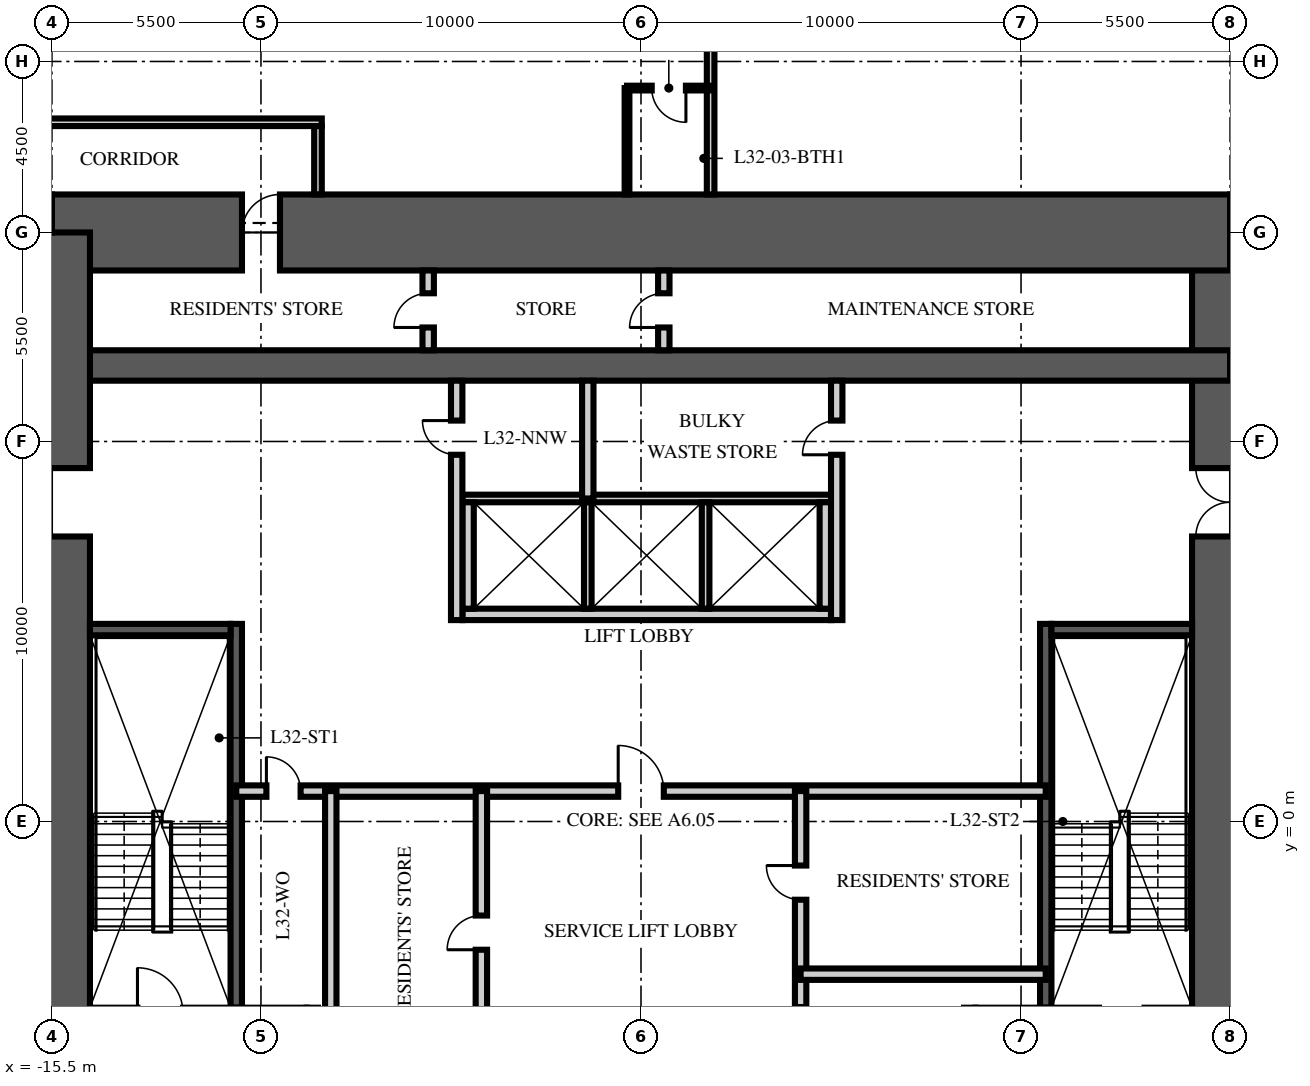
"""IFC4 building model, lengths in metres.
Left out: names, types, materials, properties, quantities, classifications, styles, units other than length and angle.
Written with IfcOpenShell. Run it as: python <this file> out.ifc"""

import sys

from ifc_helpers import new_model, si_unit, direction, frame, frame_2d, origin, place, context, subcontext, project, spatial, rectangle, extrude, element, fill, save


model = new_model("IFC4")
c1 = context("Model", 3, precision=1e-05, world=origin(), true_north=direction((0.0, 1.0)))
c2 = subcontext(c1, "Body", "Model", "MODEL_VIEW")
j1 = project(units=[si_unit("LENGTHUNIT", "METRE"), si_unit("PLANEANGLEUNIT", "RADIAN")], contexts=[c1])
p1 = place(None, origin())
s1 = spatial("IfcSite", under=j1, at=p1, CompositionType="ELEMENT")
p2 = place(p1, origin())
s2 = spatial("IfcBuilding", under=s1, at=p2, CompositionType="ELEMENT")
p3 = place(p2, frame((0.0, 0.0, 129.75)))
s3 = spatial("IfcBuildingStorey", under=s2, at=p3, CompositionType="ELEMENT", Elevation=129.75)
p4 = place(p3, frame((15.5, -15.5, -0.25), z_axis=(0.0, 0.0, 1.0), x_axis=(0.0, 1.0, 0.0)))
e1 = element("IfcWall", 1, at=p4, inside=s3, PredefinedType="SHEAR", context=c2, shape_type="SweptSolid", body=[
    extrude(rectangle(XDim=31.0, YDim=2.0, at=frame_2d((15.5, 0.0))), origin(), (0.0, 0.0, 1.0), 3.75),
])
p5 = place(p4, frame((6.5, 0.0, 0.25)))
e2 = element("IfcOpeningElement", 2, at=p5, cuts=e1, PredefinedType="OPENING", context=c2, shape_type="SweptSolid", body=[
    extrude(rectangle(XDim=1.2, YDim=2.1, at=frame_2d((0.6, 1.05))), frame((0.0, 1.01, 0.0), z_axis=(0.0, -1.0, 0.0), x_axis=(1.0, 0.0, 0.0)), (0.0, 0.0, 1.0), 2.02),
])
p6 = place(p4, frame((23.0, 0.0, 0.25)))
e3 = element("IfcOpeningElement", 3, at=p6, cuts=e1, PredefinedType="OPENING", context=c2, shape_type="SweptSolid", body=[
    extrude(rectangle(XDim=1.8, YDim=2.1, at=frame_2d((0.9, 1.05))), frame((0.0, 1.01, 0.0), z_axis=(0.0, -1.0, 0.0), x_axis=(1.0, 0.0, 0.0)), (0.0, 0.0, 1.0), 2.02),
])
p7 = place(p3, frame((-15.5, 15.5, -0.25), z_axis=(0.0, 0.0, 1.0), x_axis=(1.0, 0.0, 0.0)))
e4 = element("IfcWall", 4, at=p7, inside=s3, PredefinedType="SHEAR", context=c2, shape_type="SweptSolid", body=[
    extrude(rectangle(XDim=31.0, YDim=2.0, at=frame_2d((15.5, 0.0))), origin(), (0.0, 0.0, 1.0), 3.75),
])
p8 = place(p7, frame((5.0, 0.0, 0.25)))
e5 = element("IfcOpeningElement", 5, at=p8, cuts=e4, PredefinedType="OPENING", context=c2, shape_type="SweptSolid", body=[
    extrude(rectangle(XDim=1.0, YDim=2.1, at=frame_2d((0.5, 1.05))), frame((0.0, 1.01, 0.0), z_axis=(0.0, -1.0, 0.0), x_axis=(1.0, 0.0, 0.0)), (0.0, 0.0, 1.0), 2.02),
])
p9 = place(p3, frame((-15.5, 12.0, -0.25), z_axis=(0.0, 0.0, 1.0), x_axis=(1.0, 0.0, 0.0)))
e6 = element("IfcWall", 6, at=p9, inside=s3, PredefinedType="SHEAR", context=c2, shape_type="SweptSolid", body=[
    extrude(rectangle(XDim=31.0, YDim=0.8, at=frame_2d((15.5, 0.0))), origin(), (0.0, 0.0, 1.0), 3.75),
])
p10 = place(p3, frame((-15.5, -15.5, -0.25), z_axis=(0.0, 0.0, 1.0), x_axis=(0.0, 1.0, 0.0)))
e7 = element("IfcWall", 7, at=p10, inside=s3, PredefinedType="SHEAR", context=c2, shape_type="SweptSolid", body=[
    extrude(rectangle(XDim=31.0, YDim=2.0, at=frame_2d((15.5, 0.0))), origin(), (0.0, 0.0, 1.0), 3.75),
])
p11 = place(p10, frame((6.5, 0.0, 0.25)))
e8 = element("IfcOpeningElement", 8, at=p11, cuts=e7, PredefinedType="OPENING", context=c2, shape_type="SweptSolid", body=[
    extrude(rectangle(XDim=1.2, YDim=2.1, at=frame_2d((0.6, 1.05))), frame((0.0, 1.01, 0.0), z_axis=(0.0, -1.0, 0.0), x_axis=(1.0, 0.0, 0.0)), (0.0, 0.0, 1.0), 2.02),
])
p12 = place(p10, frame((23.0, 0.0, 0.25)))
e9 = element("IfcOpeningElement", 9, at=p12, cuts=e7, PredefinedType="OPENING", context=c2, shape_type="SweptSolid", body=[
    extrude(rectangle(XDim=1.8, YDim=2.1, at=frame_2d((0.9, 1.05))), frame((0.0, 1.01, 0.0), z_axis=(0.0, -1.0, 0.0), x_axis=(1.0, 0.0, 0.0)), (0.0, 0.0, 1.0), 2.02),
])
p13 = place(p3, frame((-10.65, -4.9, 0.0), z_axis=(0.0, 0.0, 1.0), x_axis=(0.0, 1.0, 0.0)))
e10 = element("IfcWall", 10, at=p13, inside=s3, PredefinedType="SOLIDWALL", context=c2, shape_type="SweptSolid", body=[
    extrude(rectangle(XDim=10.1, YDim=0.3, at=frame_2d((5.05, 0.0))), origin(), (0.0, 0.0, 1.0), 3.5),
])
p14 = place(p3, frame((-14.5, 5.05, 0.0), z_axis=(0.0, 0.0, 1.0), x_axis=(1.0, 0.0, 0.0)))
e11 = element("IfcWall", 11, at=p14, inside=s3, PredefinedType="SOLIDWALL", context=c2, shape_type="SweptSolid", body=[
    extrude(rectangle(XDim=3.7, YDim=0.3, at=frame_2d((1.85, 0.0))), origin(), (0.0, 0.0, 1.0), 3.5),
])
p15 = place(p3, frame((10.65, -4.9, 0.0), z_axis=(0.0, 0.0, 1.0), x_axis=(0.0, 1.0, 0.0)))
e12 = element("IfcWall", 12, at=p15, inside=s3, PredefinedType="SOLIDWALL", context=c2, shape_type="SweptSolid", body=[
    extrude(rectangle(XDim=10.1, YDim=0.3, at=frame_2d((5.05, 0.0))), origin(), (0.0, 0.0, 1.0), 3.5),
])
p16 = place(p3, frame((14.5, 5.05, 0.0), z_axis=(0.0, 0.0, 1.0), x_axis=(-1.0, 0.0, 0.0)))
e13 = element("IfcWall", 13, at=p16, inside=s3, PredefinedType="SOLIDWALL", context=c2, shape_type="SweptSolid", body=[
    extrude(rectangle(XDim=3.7, YDim=0.3, at=frame_2d((1.85, 0.0))), origin(), (0.0, 0.0, 1.0), 3.5),
])
p17 = place(p3, frame((-4.7, 5.45, 0.0), z_axis=(0.0, 0.0, 1.0), x_axis=(1.0, 0.0, 0.0)))
e14 = element("IfcWall", 14, at=p17, inside=s3, PredefinedType="PARTITIONING", context=c2, shape_type="SweptSolid", body=[
    extrude(rectangle(XDim=9.7, YDim=0.3, at=frame_2d((4.85, 0.0))), origin(), (0.0, 0.0, 1.0), 3.5),
])
p18 = place(p3, frame((-4.7, 8.5, 0.0), z_axis=(0.0, 0.0, 1.0), x_axis=(1.0, 0.0, 0.0)))
e15 = element("IfcWall", 15, at=p18, inside=s3, PredefinedType="PARTITIONING", context=c2, shape_type="SweptSolid", body=[
    extrude(rectangle(XDim=9.7, YDim=0.2, at=frame_2d((4.85, 0.0))), origin(), (0.0, 0.0, 1.0), 3.5),
])
for number, where, z_axis, x_axis in (
    (16, (-4.55, 5.6, 0.0), (0.0, 0.0, 1.0), (0.0, 1.0, 0.0)),
    (17, (4.85, 5.6, 0.0), (0.0, 0.0, 1.0), (0.0, 1.0, 0.0)),
):
    element("IfcWall", number, at=place(p3, frame(where, z_axis=z_axis, x_axis=x_axis)), inside=s3, PredefinedType="PARTITIONING", context=c2, shape_type="SweptSolid", body=[
        extrude(rectangle(XDim=2.8, YDim=0.3, at=frame_2d((1.4, 0.0))), origin(), (0.0, 0.0, 1.0), 3.5),
    ])
for number, where, z_axis, x_axis in (
    (18, (-1.4, 5.6, 0.0), (0.0, 0.0, 1.0), (0.0, 1.0, 0.0)),
    (19, (1.7, 5.6, 0.0), (0.0, 0.0, 1.0), (0.0, 1.0, 0.0)),
):
    element("IfcWall", number, at=place(p3, frame(where, z_axis=z_axis, x_axis=x_axis)), inside=s3, PredefinedType="PARTITIONING", context=c2, shape_type="SweptSolid", body=[
        extrude(rectangle(XDim=2.8, YDim=0.2, at=frame_2d((1.4, 0.0))), origin(), (0.0, 0.0, 1.0), 3.5),
    ])
p19 = place(p3, frame((-10.65, 0.8, 0.0), z_axis=(0.0, 0.0, 1.0), x_axis=(1.0, 0.0, 0.0)))
e20 = element("IfcWall", 20, at=p19, inside=s3, PredefinedType="PARTITIONING", context=c2, shape_type="SweptSolid", body=[
    extrude(rectangle(XDim=21.3, YDim=0.3, at=frame_2d((10.65, 0.0))), origin(), (0.0, 0.0, 1.0), 3.5),
])
p20 = place(p19, frame((10.05, 0.0, 0.0)))
e21 = element("IfcOpeningElement", 21, at=p20, cuts=e20, PredefinedType="OPENING", context=c2, shape_type="SweptSolid", body=[
    extrude(rectangle(XDim=1.2, YDim=2.1, at=frame_2d((0.6, 1.05))), frame((0.0, 0.16, 0.0), z_axis=(0.0, -1.0, 0.0), x_axis=(1.0, 0.0, 0.0)), (0.0, 0.0, 1.0), 0.32),
])
p21 = place(p19, frame((0.793, 0.0, 0.0)))
e22 = element("IfcOpeningElement", 22, at=p21, cuts=e20, PredefinedType="OPENING", context=c2, shape_type="SweptSolid", body=[
    extrude(rectangle(XDim=0.9, YDim=2.1, at=frame_2d((0.45, 1.05))), frame((0.0, 0.16, 0.0), z_axis=(0.0, -1.0, 0.0), x_axis=(1.0, 0.0, 0.0)), (0.0, 0.0, 1.0), 0.32),
])
p22 = place(p3, frame((-4.2, -6.65, 0.0), z_axis=(0.0, 0.0, 1.0), x_axis=(0.0, 1.0, 0.0)))
e23 = element("IfcWall", 23, at=p22, inside=s3, PredefinedType="PARTITIONING", context=c2, shape_type="SweptSolid", body=[
    extrude(rectangle(XDim=7.45, YDim=0.3, at=frame_2d((3.725, 0.0))), origin(), (0.0, 0.0, 1.0), 3.5),
])
p23 = place(p22, frame((3.275, 0.0, 0.0)))
e24 = element("IfcOpeningElement", 24, at=p23, cuts=e23, PredefinedType="OPENING", context=c2, shape_type="SweptSolid", body=[
    extrude(rectangle(XDim=0.9, YDim=2.1, at=frame_2d((0.45, 1.05))), frame((0.0, 0.16, 0.0), z_axis=(0.0, -1.0, 0.0), x_axis=(1.0, 0.0, 0.0)), (0.0, 0.0, 1.0), 0.32),
])
p24 = place(p3, frame((4.2, -6.65, 0.0), z_axis=(0.0, 0.0, 1.0), x_axis=(0.0, 1.0, 0.0)))
e25 = element("IfcWall", 25, at=p24, inside=s3, PredefinedType="PARTITIONING", context=c2, shape_type="SweptSolid", body=[
    extrude(rectangle(XDim=7.45, YDim=0.3, at=frame_2d((3.725, 0.0))), origin(), (0.0, 0.0, 1.0), 3.5),
])
p25 = place(p24, frame((0.866, 0.0, 0.0)))
e26 = element("IfcOpeningElement", 26, at=p25, cuts=e25, PredefinedType="OPENING", context=c2, shape_type="SweptSolid", body=[
    extrude(rectangle(XDim=0.9, YDim=2.1, at=frame_2d((0.45, 1.05))), frame((0.0, 0.16, 0.0), z_axis=(0.0, -1.0, 0.0), x_axis=(1.0, 0.0, 0.0)), (0.0, 0.0, 1.0), 0.32),
])
p26 = place(p24, frame((4.591, 0.0, 0.0)))
e27 = element("IfcOpeningElement", 27, at=p26, cuts=e25, PredefinedType="OPENING", context=c2, shape_type="SweptSolid", body=[
    extrude(rectangle(XDim=0.9, YDim=2.1, at=frame_2d((0.45, 1.05))), frame((0.0, 0.16, 0.0), z_axis=(0.0, -1.0, 0.0), x_axis=(1.0, 0.0, 0.0)), (0.0, 0.0, 1.0), 0.32),
])
p27 = place(p3, frame((-8.163, -6.65, 0.0), z_axis=(0.0, 0.0, 1.0), x_axis=(0.0, 1.0, 0.0)))
e28 = element("IfcWall", 28, at=p27, inside=s3, PredefinedType="PARTITIONING", context=c2, shape_type="SweptSolid", body=[
    extrude(rectangle(XDim=7.45, YDim=0.3, at=frame_2d((3.725, 0.0))), origin(), (0.0, 0.0, 1.0), 3.5),
])
p28 = place(p3, frame((10.65, -4.018, 0.0), z_axis=(0.0, 0.0, 1.0), x_axis=(-1.0, 0.0, 0.0)))
e29 = element("IfcWall", 29, at=p28, inside=s3, PredefinedType="PARTITIONING", context=c2, shape_type="SweptSolid", body=[
    extrude(rectangle(XDim=6.45, YDim=0.3, at=frame_2d((3.225, 0.0))), origin(), (0.0, 0.0, 1.0), 3.5),
])
p29 = place(p3, frame((-4.85, 5.3, 0.0), z_axis=(0.0, 0.0, 1.0), x_axis=(0.0, 1.0, 0.0)))
e30 = element("IfcWall", 30, at=p29, inside=s3, PredefinedType="PARTITIONING", context=c2, shape_type="SweptSolid", body=[
    extrude(rectangle(XDim=6.3, YDim=0.3, at=frame_2d((3.15, 0.0))), origin(), (0.0, 0.0, 1.0), 3.5),
])
p30 = place(p29, frame((4.35, 0.0, 0.0)))
e31 = element("IfcOpeningElement", 31, at=p30, cuts=e30, PredefinedType="OPENING", context=c2, shape_type="SweptSolid", body=[
    extrude(rectangle(XDim=0.9, YDim=2.1, at=frame_2d((0.45, 1.05))), frame((0.0, 0.16, 0.0), z_axis=(0.0, -1.0, 0.0), x_axis=(1.0, 0.0, 0.0)), (0.0, 0.0, 1.0), 0.32),
])
p31 = place(p3, frame((5.15, 5.3, 0.0), z_axis=(0.0, 0.0, 1.0), x_axis=(0.0, 1.0, 0.0)))
e32 = element("IfcWall", 32, at=p31, inside=s3, PredefinedType="PARTITIONING", context=c2, shape_type="SweptSolid", body=[
    extrude(rectangle(XDim=6.3, YDim=0.3, at=frame_2d((3.15, 0.0))), origin(), (0.0, 0.0, 1.0), 3.5),
])
p32 = place(p31, frame((4.35, 0.0, 0.0)))
e33 = element("IfcOpeningElement", 33, at=p32, cuts=e32, PredefinedType="OPENING", context=c2, shape_type="SweptSolid", body=[
    extrude(rectangle(XDim=0.9, YDim=2.1, at=frame_2d((0.45, 1.05))), frame((0.0, 0.16, 0.0), z_axis=(0.0, -1.0, 0.0), x_axis=(1.0, 0.0, 0.0)), (0.0, 0.0, 1.0), 0.32),
])
p33 = place(p3, frame((-1.4, 8.5, 0.0), z_axis=(0.0, 0.0, 1.0), x_axis=(0.0, 1.0, 0.0)))
e34 = element("IfcWall", 34, at=p33, inside=s3, PredefinedType="PARTITIONING", context=c2, shape_type="SweptSolid", body=[
    extrude(rectangle(XDim=3.1, YDim=0.3, at=frame_2d((1.55, 0.0))), origin(), (0.0, 0.0, 1.0), 3.5),
])
p34 = place(p3, frame((-5.6, 12.4, 0.0), z_axis=(0.0, 0.0, 1.0), x_axis=(0.0, 1.0, 0.0)))
e35 = element("IfcWall", 35, at=p34, inside=s3, PredefinedType="PARTITIONING", context=c2, shape_type="SweptSolid", body=[
    extrude(rectangle(XDim=2.1, YDim=0.3, at=frame_2d((1.05, 0.0))), origin(), (0.0, 0.0, 1.0), 3.5),
])
p35 = place(p34, frame((0.6, 0.0, 0.0)))
e36 = element("IfcOpeningElement", 36, at=p35, cuts=e35, PredefinedType="OPENING", context=c2, shape_type="SweptSolid", body=[
    extrude(rectangle(XDim=0.9, YDim=2.1, at=frame_2d((0.45, 1.05))), frame((0.0, 0.16, 0.0), z_axis=(0.0, -1.0, 0.0), x_axis=(1.0, 0.0, 0.0)), (0.0, 0.0, 1.0), 0.32),
])
p36 = place(p3, frame((0.6, 12.4, 0.0), z_axis=(0.0, 0.0, 1.0), x_axis=(0.0, 1.0, 0.0)))
e37 = element("IfcWall", 37, at=p36, inside=s3, PredefinedType="PARTITIONING", context=c2, shape_type="SweptSolid", body=[
    extrude(rectangle(XDim=2.1, YDim=0.3, at=frame_2d((1.05, 0.0))), origin(), (0.0, 0.0, 1.0), 3.5),
])
p37 = place(p36, frame((0.6, 0.0, 0.0)))
e38 = element("IfcOpeningElement", 38, at=p37, cuts=e37, PredefinedType="OPENING", context=c2, shape_type="SweptSolid", body=[
    extrude(rectangle(XDim=0.9, YDim=2.1, at=frame_2d((0.45, 1.05))), frame((0.0, 0.16, 0.0), z_axis=(0.0, -1.0, 0.0), x_axis=(1.0, 0.0, 0.0)), (0.0, 0.0, 1.0), 0.32),
])
p38 = place(p3, frame((-18.5, 18.4, 0.0), z_axis=(0.0, 0.0, 1.0), x_axis=(1.0, 0.0, 0.0)))
e39 = element("IfcWall", 39, at=p38, inside=s3, PredefinedType="PARTITIONING", context=c2, shape_type="SweptSolid", body=[
    extrude(rectangle(XDim=10.1, YDim=0.2, at=frame_2d((5.05, 0.0))), origin(), (0.0, 0.0, 1.0), 2.3),
])
p39 = place(p3, frame((-8.5, 18.3, 0.0), z_axis=(0.0, 0.0, 1.0), x_axis=(0.0, -1.0, 0.0)))
e40 = element("IfcWall", 40, at=p39, inside=s3, PredefinedType="PARTITIONING", context=c2, shape_type="SweptSolid", body=[
    extrude(rectangle(XDim=1.8, YDim=0.2, at=frame_2d((0.9, 0.0))), origin(), (0.0, 0.0, 1.0), 3.5),
])
p40 = place(p3, frame((1.832, 16.5, 0.0), z_axis=(0.0, 0.0, 1.0), x_axis=(0.0, 1.0, 0.0)))
e41 = element("IfcWall", 41, at=p40, inside=s3, PredefinedType="PARTITIONING", context=c2, shape_type="SweptSolid", body=[
    extrude(rectangle(XDim=12.4, YDim=0.2, at=frame_2d((6.2, 0.0))), origin(), (0.0, 0.0, 1.0), 2.81),
])
p41 = place(p3, frame((1.832, 19.3, 0.0), z_axis=(0.0, 0.0, 1.0), x_axis=(-1.0, 0.0, 0.0)))
e42 = element("IfcWall", 42, at=p41, inside=s3, PredefinedType="PARTITIONING", context=c2, shape_type="SweptSolid", body=[
    extrude(rectangle(XDim=2.2, YDim=0.125, at=frame_2d((1.1, 0.0))), origin(), (0.0, 0.0, 1.0), 2.7),
])
p42 = place(p41, frame((0.65, 0.0, 0.0)))
e43 = element("IfcOpeningElement", 43, at=p42, cuts=e42, PredefinedType="OPENING", context=c2, shape_type="SweptSolid", body=[
    extrude(rectangle(XDim=0.9, YDim=2.1, at=frame_2d((0.45, 1.05))), frame((0.0, 0.073, 0.0), z_axis=(0.0, -1.0, 0.0), x_axis=(1.0, 0.0, 0.0)), (0.0, 0.0, 1.0), 0.145),
])
p43 = place(p3, frame((-0.368, 16.5, 0.0), z_axis=(0.0, 0.0, 1.0), x_axis=(0.0, 1.0, 0.0)))
e44 = element("IfcWall", 44, at=p43, inside=s3, PredefinedType="PARTITIONING", context=c2, shape_type="SweptSolid", body=[
    extrude(rectangle(XDim=2.8, YDim=0.125, at=frame_2d((1.4, 0.0))), origin(), (0.0, 0.0, 1.0), 3.5),
])
p44 = place(p12, origin())
e45 = element("IfcDoor", 45, at=p44, inside=s3, OperationType="DOUBLE_DOOR_SINGLE_SWING", PredefinedType="DOOR", context=c2, shape_type="SweptSolid", body=[
    extrude(rectangle(XDim=1.8, YDim=2.1, at=frame_2d((0.9, 1.05))), frame((0.0, 0.025, 0.0), z_axis=(0.0, -1.0, 0.0), x_axis=(1.0, 0.0, 0.0)), (0.0, 0.0, 1.0), 0.05),
])
fill(e9, e45)
p45 = place(p6, origin())
e46 = element("IfcDoor", 46, at=p45, inside=s3, OperationType="DOUBLE_DOOR_SINGLE_SWING", PredefinedType="DOOR", context=c2, shape_type="SweptSolid", body=[
    extrude(rectangle(XDim=1.8, YDim=2.1, at=frame_2d((0.9, 1.05))), frame((0.0, 0.025, 0.0), z_axis=(0.0, -1.0, 0.0), x_axis=(1.0, 0.0, 0.0)), (0.0, 0.0, 1.0), 0.05),
])
fill(e3, e46)
p46 = place(p20, origin())
e47 = element("IfcDoor", 47, at=p46, inside=s3, OperationType="SINGLE_SWING_LEFT", PredefinedType="DOOR", context=c2, shape_type="SweptSolid", body=[
    extrude(rectangle(XDim=1.2, YDim=2.1, at=frame_2d((0.6, 1.05))), frame((0.0, 0.025, 0.0), z_axis=(0.0, -1.0, 0.0), x_axis=(1.0, 0.0, 0.0)), (0.0, 0.0, 1.0), 0.05),
])
fill(e21, e47)
p47 = place(p23, origin())
e48 = element("IfcDoor", 48, at=p47, inside=s3, OperationType="SINGLE_SWING_LEFT", PredefinedType="DOOR", context=c2, shape_type="SweptSolid", body=[
    extrude(rectangle(XDim=0.9, YDim=2.1, at=frame_2d((0.45, 1.05))), frame((0.0, 0.025, 0.0), z_axis=(0.0, -1.0, 0.0), x_axis=(1.0, 0.0, 0.0)), (0.0, 0.0, 1.0), 0.05),
])
fill(e24, e48)
p48 = place(p21, origin())
e49 = element("IfcDoor", 49, at=p48, inside=s3, OperationType="SINGLE_SWING_LEFT", PredefinedType="DOOR", context=c2, shape_type="SweptSolid", body=[
    extrude(rectangle(XDim=0.9, YDim=2.1, at=frame_2d((0.45, 1.05))), frame((0.0, 0.025, 0.0), z_axis=(0.0, -1.0, 0.0), x_axis=(1.0, 0.0, 0.0)), (0.0, 0.0, 1.0), 0.05),
])
fill(e22, e49)
p49 = place(p26, origin())
e50 = element("IfcDoor", 50, at=p49, inside=s3, OperationType="SINGLE_SWING_RIGHT", PredefinedType="DOOR", context=c2, shape_type="SweptSolid", body=[
    extrude(rectangle(XDim=0.9, YDim=2.1, at=frame_2d((0.45, 1.05))), frame((0.0, 0.025, 0.0), z_axis=(0.0, -1.0, 0.0), x_axis=(1.0, 0.0, 0.0)), (0.0, 0.0, 1.0), 0.05),
])
fill(e27, e50)
p50 = place(p30, origin())
e51 = element("IfcDoor", 51, at=p50, inside=s3, OperationType="SINGLE_SWING_RIGHT", PredefinedType="DOOR", context=c2, shape_type="SweptSolid", body=[
    extrude(rectangle(XDim=0.9, YDim=2.1, at=frame_2d((0.45, 1.05))), frame((0.0, 0.025, 0.0), z_axis=(0.0, -1.0, 0.0), x_axis=(1.0, 0.0, 0.0)), (0.0, 0.0, 1.0), 0.05),
])
fill(e31, e51)
p51 = place(p32, origin())
e52 = element("IfcDoor", 52, at=p51, inside=s3, OperationType="SINGLE_SWING_LEFT", PredefinedType="DOOR", context=c2, shape_type="SweptSolid", body=[
    extrude(rectangle(XDim=0.9, YDim=2.1, at=frame_2d((0.45, 1.05))), frame((0.0, 0.025, 0.0), z_axis=(0.0, -1.0, 0.0), x_axis=(1.0, 0.0, 0.0)), (0.0, 0.0, 1.0), 0.05),
])
fill(e33, e52)
p52 = place(p35, origin())
e53 = element("IfcDoor", 53, at=p52, inside=s3, OperationType="SINGLE_SWING_LEFT", PredefinedType="DOOR", context=c2, shape_type="SweptSolid", body=[
    extrude(rectangle(XDim=0.9, YDim=2.1, at=frame_2d((0.45, 1.05))), frame((0.0, 0.025, 0.0), z_axis=(0.0, -1.0, 0.0), x_axis=(1.0, 0.0, 0.0)), (0.0, 0.0, 1.0), 0.05),
])
fill(e36, e53)
p53 = place(p37, origin())
e54 = element("IfcDoor", 54, at=p53, inside=s3, OperationType="SINGLE_SWING_LEFT", PredefinedType="DOOR", context=c2, shape_type="SweptSolid", body=[
    extrude(rectangle(XDim=0.9, YDim=2.1, at=frame_2d((0.45, 1.05))), frame((0.0, 0.025, 0.0), z_axis=(0.0, -1.0, 0.0), x_axis=(1.0, 0.0, 0.0)), (0.0, 0.0, 1.0), 0.05),
])
fill(e38, e54)
p54 = place(p8, origin())
e55 = element("IfcDoor", 55, at=p54, inside=s3, OperationType="SINGLE_SWING_RIGHT", PredefinedType="DOOR", context=c2, shape_type="SweptSolid", body=[
    extrude(rectangle(XDim=1.0, YDim=2.1, at=frame_2d((0.5, 1.05))), frame((0.0, 0.025, 0.0), z_axis=(0.0, -1.0, 0.0), x_axis=(1.0, 0.0, 0.0)), (0.0, 0.0, 1.0), 0.05),
])
fill(e5, e55)
p55 = place(p42, origin())
e56 = element("IfcDoor", 56, at=p55, inside=s3, OperationType="SINGLE_SWING_LEFT", PredefinedType="DOOR", context=c2, shape_type="SweptSolid", body=[
    extrude(rectangle(XDim=0.9, YDim=2.1, at=frame_2d((0.45, 1.05))), frame((0.0, 0.025, 0.0), z_axis=(0.0, -1.0, 0.0), x_axis=(1.0, 0.0, 0.0)), (0.0, 0.0, 1.0), 0.05),
])
fill(e43, e56)
save(model, sys.argv[1])
